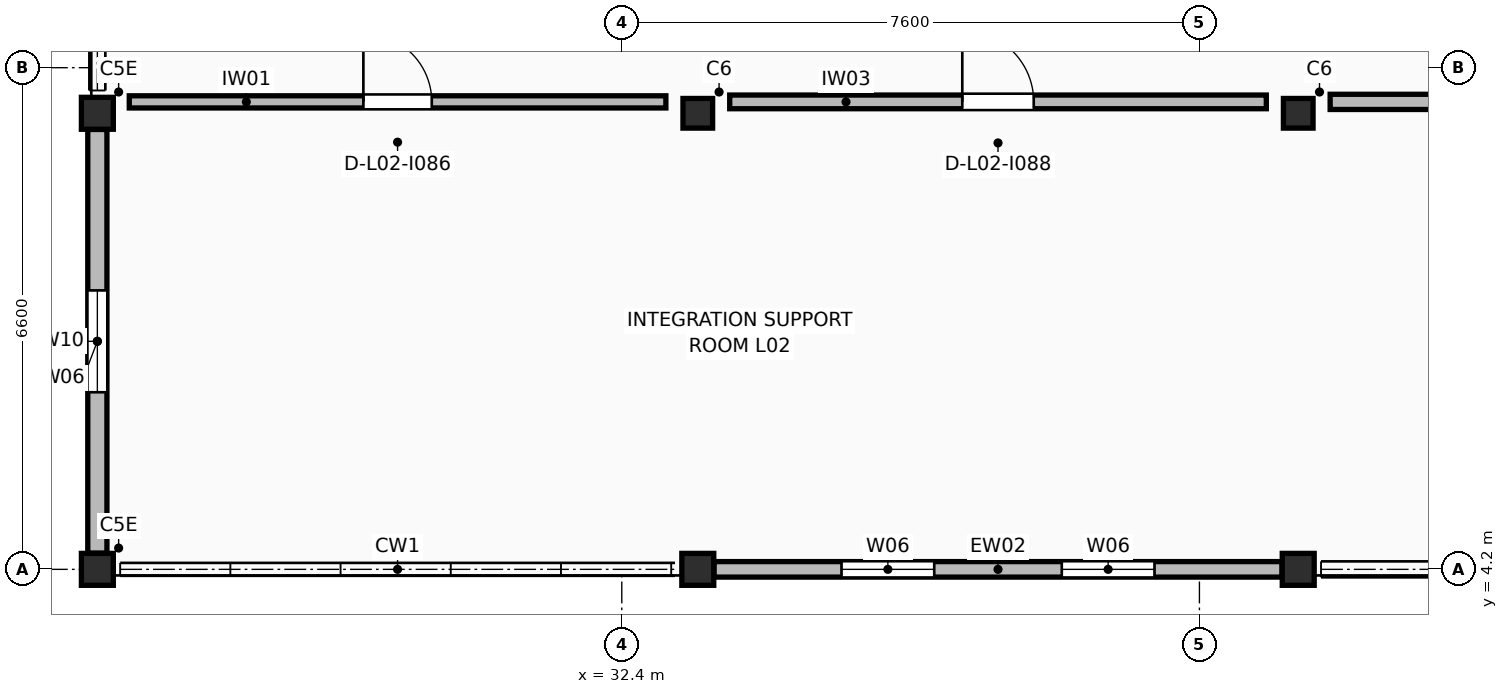
"""IFC4 building model, lengths in metres.
Left out: names, types, materials, properties, quantities, classifications, styles, units other than length and angle.
Written with IfcOpenShell. Run it as: python <this file> out.ifc"""

import sys

from ifc_helpers import new_model, si_unit, direction, frame, frame_2d, origin, origin_2d, place, context, subcontext, project, spatial, rectangle, extrude, element, fill, save


model = new_model("IFC4")
c1 = context("Model", 3, precision=1e-05, world=origin(), true_north=direction((0.0, 1.0)))
c2 = subcontext(c1, "Body", "Model", "MODEL_VIEW")
j1 = project(units=[si_unit("LENGTHUNIT", "METRE"), si_unit("PLANEANGLEUNIT", "RADIAN")], contexts=[c1])
p1 = place(None, origin())
s1 = spatial("IfcSite", under=j1, at=p1, CompositionType="ELEMENT")
p2 = place(p1, origin())
s2 = spatial("IfcBuilding", under=s1, at=p2, CompositionType="ELEMENT")
p3 = place(p2, frame((0.0, 0.0, 8.16)))
s3 = spatial("IfcBuildingStorey", under=s2, at=p3, CompositionType="ELEMENT", Elevation=8.16)
for number, where, z_axis, x_axis in (
    (1, (25.5, 4.2, 0.0), (0.0, 0.0, 1.0), (1.0, 0.0, 0.0)),
    (2, (25.5, 10.2, 0.0), (0.0, 0.0, 1.0), (1.0, 0.0, 0.0)),
    (3, (33.4, 4.2, 0.0), (0.0, 0.0, 1.0), (1.0, 0.0, 0.0)),
):
    element("IfcColumn", number, at=place(p3, frame(where, z_axis=z_axis, x_axis=x_axis)), inside=s3, PredefinedType="COLUMN", context=c2, shape_type="SweptSolid", body=[
        extrude(rectangle(XDim=0.42, YDim=0.42, at=origin_2d()), origin(), (0.0, 0.0, 1.0), 3.74),
    ])
p4 = place(p3, frame((33.4, 10.2, 0.0), z_axis=(0.0, 0.0, 1.0), x_axis=(1.0, 0.0, 0.0)))
e4 = element("IfcColumn", 4, at=p4, inside=s3, PredefinedType="COLUMN", context=c2, shape_type="SweptSolid", body=[
    extrude(rectangle(XDim=0.39, YDim=0.39, at=origin_2d()), origin(), (0.0, 0.0, 1.0), 3.74),
])
p5 = place(p3, frame((41.3, 4.2, 0.0), z_axis=(0.0, 0.0, 1.0), x_axis=(1.0, 0.0, 0.0)))
e5 = element("IfcColumn", 5, at=p5, inside=s3, PredefinedType="COLUMN", context=c2, shape_type="SweptSolid", body=[
    extrude(rectangle(XDim=0.42, YDim=0.42, at=origin_2d()), origin(), (0.0, 0.0, 1.0), 3.74),
])
p6 = place(p3, frame((41.3, 10.2, 0.0), z_axis=(0.0, 0.0, 1.0), x_axis=(1.0, 0.0, 0.0)))
e6 = element("IfcColumn", 6, at=p6, inside=s3, PredefinedType="COLUMN", context=c2, shape_type="SweptSolid", body=[
    extrude(rectangle(XDim=0.39, YDim=0.39, at=origin_2d()), origin(), (0.0, 0.0, 1.0), 3.74),
])
p7 = place(p3, frame((33.613, 4.2, 0.0), z_axis=(0.0, 0.0, 1.0), x_axis=(1.0, 0.0, 0.0)))
e7 = element("IfcWall", 7, at=p7, inside=s3, PredefinedType="STANDARD", context=c2, shape_type="SweptSolid", body=[
    extrude(rectangle(XDim=7.474, YDim=0.204, at=frame_2d((3.737, 0.0))), origin(), (0.0, 0.0, 1.0), 2.78),
])
p8 = place(p7, frame((1.678, 0.0, 0.95)))
e8 = element("IfcOpeningElement", 8, at=p8, cuts=e7, PredefinedType="OPENING", context=c2, shape_type="SweptSolid", body=[
    extrude(rectangle(XDim=1.22, YDim=1.3, at=frame_2d((0.61, 0.65))), frame((0.0, 0.112, 0.0), z_axis=(0.0, -1.0, 0.0), x_axis=(1.0, 0.0, 0.0)), (0.0, 0.0, 1.0), 0.224),
])
p9 = place(p7, frame((4.576, 0.0, 0.95)))
e9 = element("IfcOpeningElement", 9, at=p9, cuts=e7, PredefinedType="OPENING", context=c2, shape_type="SweptSolid", body=[
    extrude(rectangle(XDim=1.22, YDim=1.3, at=frame_2d((0.61, 0.65))), frame((0.0, 0.112, 0.0), z_axis=(0.0, -1.0, 0.0), x_axis=(1.0, 0.0, 0.0)), (0.0, 0.0, 1.0), 0.224),
])
p10 = place(p3, frame((25.5, 4.413, 0.0), z_axis=(0.0, 0.0, 1.0), x_axis=(0.0, 1.0, 0.0)))
e10 = element("IfcWall", 10, at=p10, inside=s3, PredefinedType="STANDARD", context=c2, shape_type="SweptSolid", body=[
    extrude(rectangle(XDim=5.574, YDim=0.252, at=frame_2d((2.787, 0.0))), origin(), (0.0, 0.0, 1.0), 2.78),
])
p11 = place(p10, frame((2.117, 0.0, 0.95)))
e11 = element("IfcOpeningElement", 11, at=p11, cuts=e10, PredefinedType="OPENING", context=c2, shape_type="SweptSolid", body=[
    extrude(rectangle(XDim=1.34, YDim=1.3, at=frame_2d((0.67, 0.65))), frame((0.0, 0.136, 0.0), z_axis=(0.0, -1.0, 0.0), x_axis=(1.0, 0.0, 0.0)), (0.0, 0.0, 1.0), 0.272),
])
p12 = place(p3, frame((25.92, 10.35, 0.0), z_axis=(0.0, 0.0, 1.0), x_axis=(1.0, 0.0, 0.0)))
e12 = element("IfcWall", 12, at=p12, inside=s3, PredefinedType="STANDARD", context=c2, shape_type="SweptSolid", body=[
    extrude(rectangle(XDim=7.06, YDim=0.16, at=frame_2d((3.53, 0.0))), origin(), (0.0, 0.0, 1.0), 2.75),
])
p13 = place(p12, frame((3.08, 0.0, 0.0)))
e13 = element("IfcOpeningElement", 13, at=p13, cuts=e12, PredefinedType="OPENING", context=c2, shape_type="SweptSolid", body=[
    extrude(rectangle(XDim=0.9, YDim=2.18, at=frame_2d((0.45, 1.09))), frame((0.0, 0.09, 0.0), z_axis=(0.0, -1.0, 0.0), x_axis=(1.0, 0.0, 0.0)), (0.0, 0.0, 1.0), 0.18),
])
p14 = place(p3, frame((33.82, 10.35, 0.0), z_axis=(0.0, 0.0, 1.0), x_axis=(1.0, 0.0, 0.0)))
e14 = element("IfcWall", 14, at=p14, inside=s3, PredefinedType="STANDARD", context=c2, shape_type="SweptSolid", body=[
    extrude(rectangle(XDim=7.06, YDim=0.18, at=frame_2d((3.53, 0.0))), origin(), (0.0, 0.0, 1.0), 2.75),
])
p15 = place(p14, frame((3.06, 0.0, 0.0)))
e15 = element("IfcOpeningElement", 15, at=p15, cuts=e14, PredefinedType="OPENING", context=c2, shape_type="SweptSolid", body=[
    extrude(rectangle(XDim=0.94, YDim=2.06, at=frame_2d((0.47, 1.03))), frame((0.0, 0.1, 0.0), z_axis=(0.0, -1.0, 0.0), x_axis=(1.0, 0.0, 0.0)), (0.0, 0.0, 1.0), 0.2),
])
p16 = place(p3, frame((41.72, 10.35, 0.0), z_axis=(0.0, 0.0, 1.0), x_axis=(1.0, 0.0, 0.0)))
e16 = element("IfcWall", 16, at=p16, inside=s3, PredefinedType="STANDARD", context=c2, shape_type="SweptSolid", body=[
    extrude(rectangle(XDim=7.06, YDim=0.2, at=frame_2d((3.53, 0.0))), origin(), (0.0, 0.0, 1.0), 2.75),
])
p17 = place(p8, origin())
e17 = element("IfcWindow", 17, at=p17, inside=s3, PartitioningType="SINGLE_PANEL", PredefinedType="WINDOW", context=c2, shape_type="SweptSolid", body=[
    extrude(rectangle(XDim=1.22, YDim=1.3, at=frame_2d((0.61, 0.65))), frame((0.0, 0.03, 0.0), z_axis=(0.0, -1.0, 0.0), x_axis=(1.0, 0.0, 0.0)), (0.0, 0.0, 1.0), 0.06),
])
fill(e8, e17)
p18 = place(p9, origin())
e18 = element("IfcWindow", 18, at=p18, inside=s3, PartitioningType="SINGLE_PANEL", PredefinedType="WINDOW", context=c2, shape_type="SweptSolid", body=[
    extrude(rectangle(XDim=1.22, YDim=1.3, at=frame_2d((0.61, 0.65))), frame((0.0, 0.03, 0.0), z_axis=(0.0, -1.0, 0.0), x_axis=(1.0, 0.0, 0.0)), (0.0, 0.0, 1.0), 0.06),
])
fill(e9, e18)
p19 = place(p11, origin())
e19 = element("IfcWindow", 19, at=p19, inside=s3, PartitioningType="SINGLE_PANEL", PredefinedType="WINDOW", context=c2, shape_type="SweptSolid", body=[
    extrude(rectangle(XDim=1.34, YDim=1.3, at=frame_2d((0.67, 0.65))), frame((0.0, 0.03, 0.0), z_axis=(0.0, -1.0, 0.0), x_axis=(1.0, 0.0, 0.0)), (0.0, 0.0, 1.0), 0.06),
])
fill(e11, e19)
p20 = place(p13, origin())
e20 = element("IfcDoor", 20, at=p20, inside=s3, OperationType="SINGLE_SWING_LEFT", PredefinedType="DOOR", context=c2, shape_type="SweptSolid", body=[
    extrude(rectangle(XDim=0.9, YDim=2.18, at=frame_2d((0.45, 1.09))), frame((0.0, 0.025, 0.0), z_axis=(0.0, -1.0, 0.0), x_axis=(1.0, 0.0, 0.0)), (0.0, 0.0, 1.0), 0.05),
])
fill(e13, e20)
p21 = place(p15, origin())
e21 = element("IfcDoor", 21, at=p21, inside=s3, OperationType="SINGLE_SWING_LEFT", PredefinedType="DOOR", context=c2, shape_type="SweptSolid", body=[
    extrude(rectangle(XDim=0.94, YDim=2.06, at=frame_2d((0.47, 1.03))), frame((0.0, 0.025, 0.0), z_axis=(0.0, -1.0, 0.0), x_axis=(1.0, 0.0, 0.0)), (0.0, 0.0, 1.0), 0.05),
])
fill(e15, e21)
save(model, sys.argv[1])
